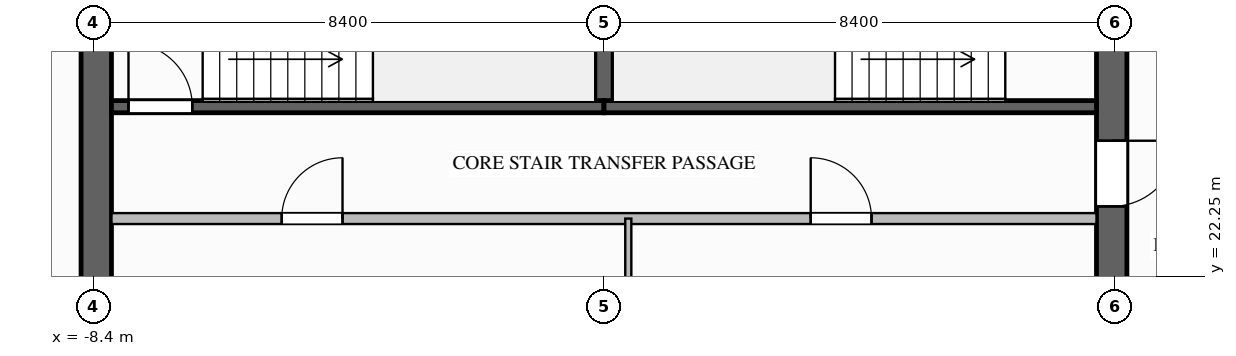
"""IFC4 building model, lengths in metres.
Left out: names, types, materials, properties, quantities, classifications, styles, units other than length and angle.
Written with IfcOpenShell. Run it as: python <this file> out.ifc"""

import sys

from ifc_helpers import new_model, si_unit, direction, frame, frame_2d, origin, place, context, subcontext, project, spatial, rectangle, extrude, element, fill, save


model = new_model("IFC4")
c1 = context("Model", 3, precision=1e-05, world=origin(), true_north=direction((0.0, 1.0)))
c2 = subcontext(c1, "Body", "Model", "MODEL_VIEW")
j1 = project(units=[si_unit("LENGTHUNIT", "METRE"), si_unit("PLANEANGLEUNIT", "RADIAN")], contexts=[c1])
p1 = place(None, origin())
s1 = spatial("IfcSite", under=j1, at=p1, CompositionType="ELEMENT")
p2 = place(p1, origin())
s2 = spatial("IfcBuilding", under=s1, at=p2, CompositionType="ELEMENT")
p3 = place(p2, frame((0.0, 0.0, 275.95)))
s3 = spatial("IfcBuildingStorey", under=s2, at=p3, CompositionType="ELEMENT", Elevation=275.95)
p4 = place(p3, frame((8.35, 35.1, 0.0), z_axis=(0.0, 0.0, 1.0), x_axis=(0.0, -1.0, 0.0)))
e1 = element("IfcWall", 1, at=p4, inside=s3, PredefinedType="SHEAR", context=c2, shape_type="SweptSolid", body=[
    extrude(rectangle(XDim=16.2, YDim=0.5, at=frame_2d((8.1, 0.0))), origin(), (0.0, 0.0, 1.0), 3.65),
])
p5 = place(p4, frame((3.08, 0.0, 0.0)))
e2 = element("IfcOpeningElement", 2, at=p5, cuts=e1, PredefinedType="OPENING", context=c2, shape_type="SweptSolid", body=[
    extrude(rectangle(XDim=1.12, YDim=2.1, at=frame_2d((0.56, 1.05))), frame((0.0, 0.26, 0.0), z_axis=(0.0, -1.0, 0.0), x_axis=(1.0, 0.0, 0.0)), (0.0, 0.0, 1.0), 0.52),
])
p6 = place(p4, frame((10.62, 0.0, 0.0)))
e3 = element("IfcOpeningElement", 3, at=p6, cuts=e1, PredefinedType="OPENING", context=c2, shape_type="SweptSolid", body=[
    extrude(rectangle(XDim=1.08, YDim=2.04, at=frame_2d((0.54, 1.02))), frame((0.0, 0.26, 0.0), z_axis=(0.0, -1.0, 0.0), x_axis=(1.0, 0.0, 0.0)), (0.0, 0.0, 1.0), 0.52),
])
p7 = place(p3, frame((-8.35, 18.9, 0.0), z_axis=(0.0, 0.0, 1.0), x_axis=(0.0, 1.0, 0.0)))
e4 = element("IfcWall", 4, at=p7, inside=s3, PredefinedType="SHEAR", context=c2, shape_type="SweptSolid", body=[
    extrude(rectangle(XDim=16.2, YDim=0.5, at=frame_2d((8.1, 0.0))), origin(), (0.0, 0.0, 1.0), 3.65),
])
p8 = place(p3, frame((0.0, 25.04, 0.0), z_axis=(0.0, 0.0, 1.0), x_axis=(0.0, 1.0, 0.0)))
e5 = element("IfcWall", 5, at=p8, inside=s3, PredefinedType="SOLIDWALL", context=c2, shape_type="SweptSolid", body=[
    extrude(rectangle(XDim=3.12, YDim=0.3, at=frame_2d((1.56, 0.0))), origin(), (0.0, 0.0, 1.0), 3.39),
])
p9 = place(p3, frame((-8.1, 25.04, 0.0), z_axis=(0.0, 0.0, 1.0), x_axis=(1.0, 0.0, 0.0)))
e6 = element("IfcWall", 6, at=p9, inside=s3, PredefinedType="SOLIDWALL", context=c2, shape_type="SweptSolid", body=[
    extrude(rectangle(XDim=8.1, YDim=0.2, at=frame_2d((4.05, 0.0))), origin(), (0.0, 0.0, 1.0), 3.39),
])
p10 = place(p9, frame((0.28, 0.0, 0.0)))
e7 = element("IfcOpeningElement", 7, at=p10, cuts=e6, PredefinedType="OPENING", context=c2, shape_type="SweptSolid", body=[
    extrude(rectangle(XDim=1.05, YDim=2.1, at=frame_2d((0.525, 1.05))), frame((0.0, 0.11, 0.0), z_axis=(0.0, -1.0, 0.0), x_axis=(1.0, 0.0, 0.0)), (0.0, 0.0, 1.0), 0.22),
])
p11 = place(p3, frame((0.0, 25.04, 0.0), z_axis=(0.0, 0.0, 1.0), x_axis=(1.0, 0.0, 0.0)))
e8 = element("IfcWall", 8, at=p11, inside=s3, PredefinedType="SOLIDWALL", context=c2, shape_type="SweptSolid", body=[
    extrude(rectangle(XDim=8.1, YDim=0.2, at=frame_2d((4.05, 0.0))), origin(), (0.0, 0.0, 1.0), 3.39),
])
p12 = place(p3, frame((-8.1, 23.2, 0.0), z_axis=(0.0, 0.0, 1.0), x_axis=(1.0, 0.0, 0.0)))
e9 = element("IfcWall", 9, at=p12, inside=s3, PredefinedType="SOLIDWALL", context=c2, shape_type="SweptSolid", body=[
    extrude(rectangle(XDim=16.2, YDim=0.18, at=frame_2d((8.1, 0.0))), origin(), (0.0, 0.0, 1.0), 3.39),
])
p13 = place(p12, frame((2.8, 0.0, 0.0)))
e10 = element("IfcOpeningElement", 10, at=p13, cuts=e9, PredefinedType="OPENING", context=c2, shape_type="SweptSolid", body=[
    extrude(rectangle(XDim=1.0, YDim=2.1, at=frame_2d((0.5, 1.05))), frame((0.0, 0.1, 0.0), z_axis=(0.0, -1.0, 0.0), x_axis=(1.0, 0.0, 0.0)), (0.0, 0.0, 1.0), 0.2),
])
p14 = place(p12, frame((11.5, 0.0, 0.0)))
e11 = element("IfcOpeningElement", 11, at=p14, cuts=e9, PredefinedType="OPENING", context=c2, shape_type="SweptSolid", body=[
    extrude(rectangle(XDim=1.0, YDim=2.1, at=frame_2d((0.5, 1.05))), frame((0.0, 0.1, 0.0), z_axis=(0.0, -1.0, 0.0), x_axis=(1.0, 0.0, 0.0)), (0.0, 0.0, 1.0), 0.2),
])
p15 = place(p3, frame((0.4, 18.9, 0.0), z_axis=(0.0, 0.0, 1.0), x_axis=(0.0, 1.0, 0.0)))
e12 = element("IfcWall", 12, at=p15, inside=s3, PredefinedType="PARTITIONING", context=c2, shape_type="SweptSolid", body=[
    extrude(rectangle(XDim=4.3, YDim=0.1, at=frame_2d((2.15, 0.0))), origin(), (0.0, 0.0, 1.0), 3.39),
])
p16 = place(p10, origin())
e13 = element("IfcDoor", 13, at=p16, inside=s3, OperationType="SINGLE_SWING_LEFT", PredefinedType="DOOR", context=c2, shape_type="SweptSolid", body=[
    extrude(rectangle(XDim=1.05, YDim=2.1, at=frame_2d((0.525, 1.05))), frame((0.0, 0.025, 0.0), z_axis=(0.0, -1.0, 0.0), x_axis=(1.0, 0.0, 0.0)), (0.0, 0.0, 1.0), 0.05),
])
fill(e7, e13)
p17 = place(p6, origin())
e14 = element("IfcDoor", 14, at=p17, inside=s3, OperationType="SINGLE_SWING_LEFT", PredefinedType="DOOR", context=c2, shape_type="SweptSolid", body=[
    extrude(rectangle(XDim=1.08, YDim=2.04, at=frame_2d((0.54, 1.02))), frame((0.0, 0.025, 0.0), z_axis=(0.0, -1.0, 0.0), x_axis=(1.0, 0.0, 0.0)), (0.0, 0.0, 1.0), 0.05),
])
fill(e3, e14)
p18 = place(p13, origin())
e15 = element("IfcDoor", 15, at=p18, inside=s3, OperationType="SINGLE_SWING_RIGHT", PredefinedType="DOOR", context=c2, shape_type="SweptSolid", body=[
    extrude(rectangle(XDim=1.0, YDim=2.1, at=frame_2d((0.5, 1.05))), frame((0.0, 0.025, 0.0), z_axis=(0.0, -1.0, 0.0), x_axis=(1.0, 0.0, 0.0)), (0.0, 0.0, 1.0), 0.05),
])
fill(e10, e15)
p19 = place(p14, origin())
e16 = element("IfcDoor", 16, at=p19, inside=s3, OperationType="SINGLE_SWING_LEFT", PredefinedType="DOOR", context=c2, shape_type="SweptSolid", body=[
    extrude(rectangle(XDim=1.0, YDim=2.1, at=frame_2d((0.5, 1.05))), frame((0.0, 0.025, 0.0), z_axis=(0.0, -1.0, 0.0), x_axis=(1.0, 0.0, 0.0)), (0.0, 0.0, 1.0), 0.05),
])
fill(e11, e16)
save(model, sys.argv[1])
